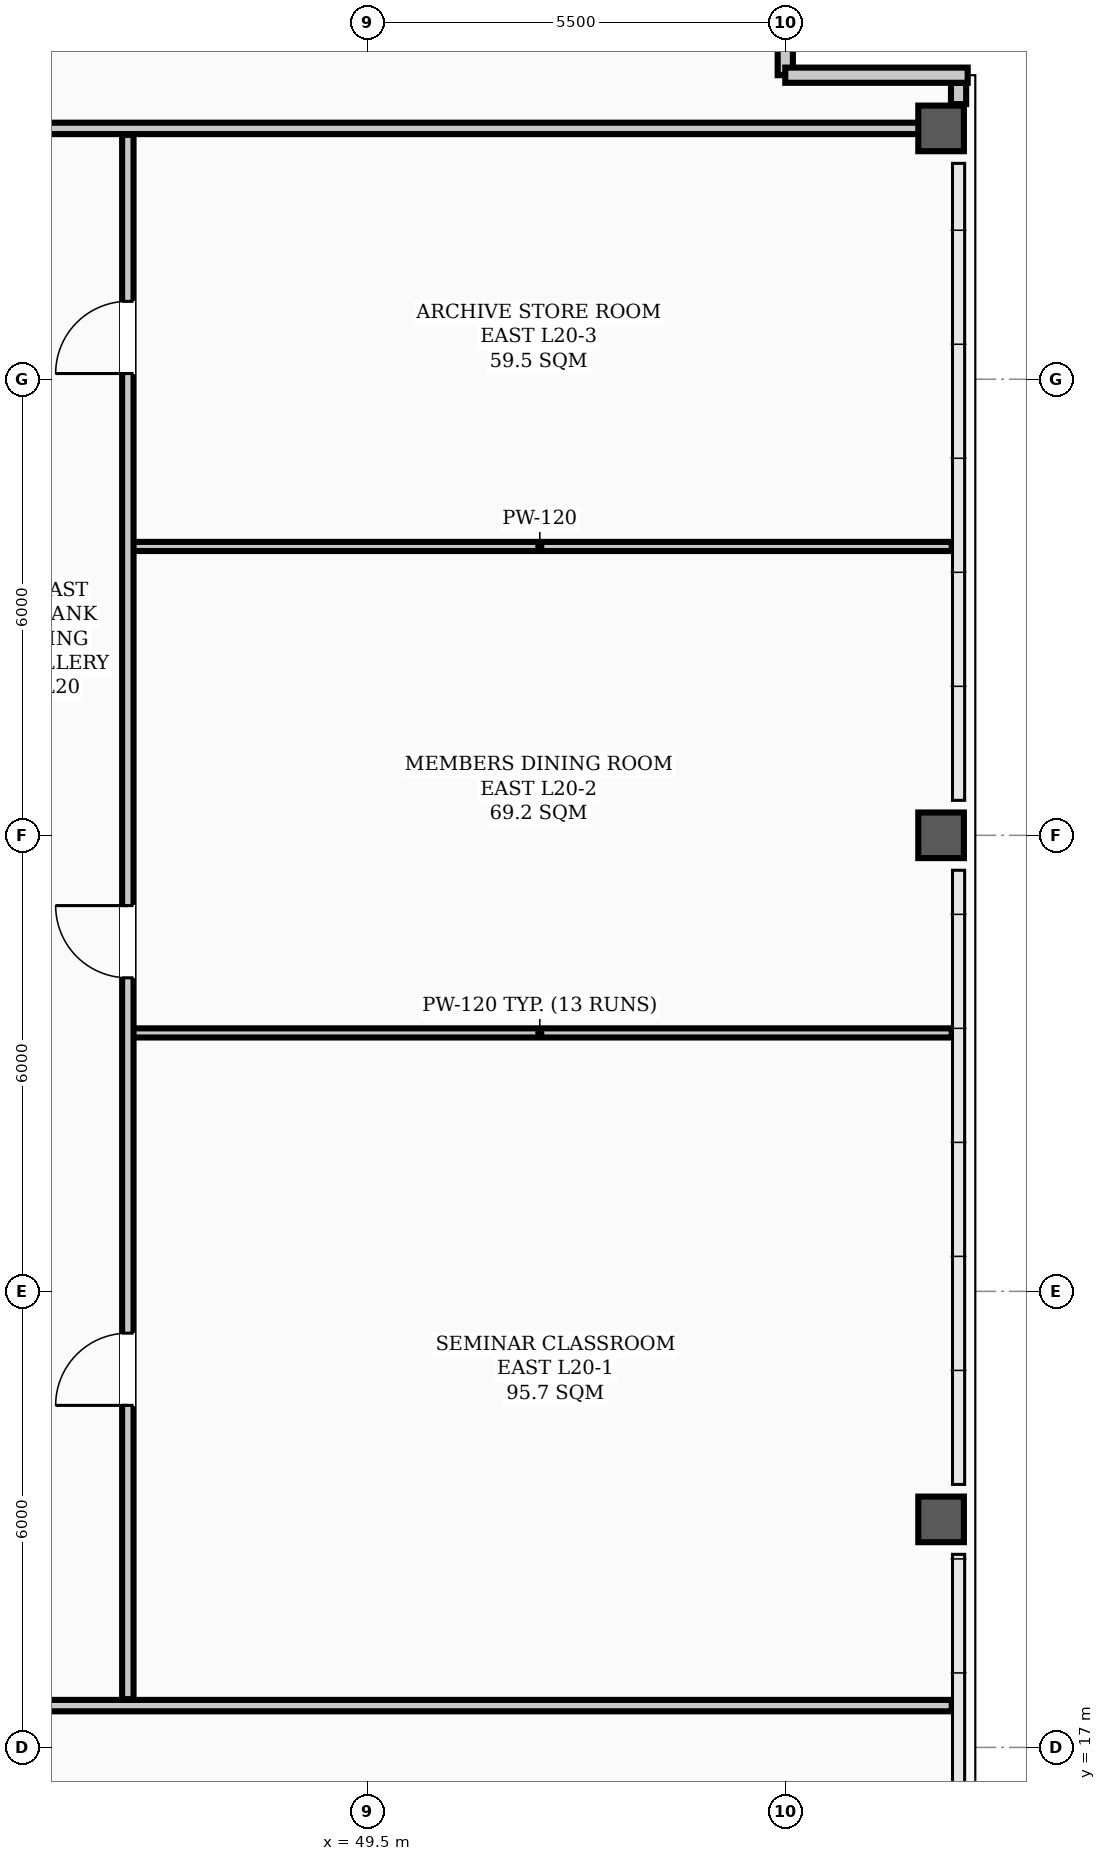
"""IFC4 building model, lengths in metres.
Left out: names, types, materials, properties, quantities, classifications, styles, units other than length and angle.
Written with IfcOpenShell. Run it as: python <this file> out.ifc"""

import sys

from ifc_helpers import new_model, si_unit, direction, frame, frame_2d, origin, origin_2d, place, context, subcontext, project, spatial, rectangle, hollow_rectangle, extrude, element, fill, save


model = new_model("IFC4")
c1 = context("Model", 3, precision=1e-05, world=origin(), true_north=direction((0.0, 1.0)))
c2 = subcontext(c1, "Body", "Model", "MODEL_VIEW")
j1 = project(units=[si_unit("LENGTHUNIT", "METRE"), si_unit("PLANEANGLEUNIT", "RADIAN")], contexts=[c1])
p1 = place(None, origin())
s1 = spatial("IfcSite", under=j1, at=p1, CompositionType="ELEMENT")
p2 = place(p1, origin())
s2 = spatial("IfcBuilding", under=s1, at=p2, CompositionType="ELEMENT")
p3 = place(p2, frame((0.0, 0.0, 81.1)))
s3 = spatial("IfcBuildingStorey", under=s2, at=p3, CompositionType="ELEMENT", Elevation=81.1)
for number, where, z_axis, x_axis in (
    (1, (57.05, 20.0, 0.0), (0.0, 0.0, 1.0), (1.0, 0.0, 0.0)),
    (2, (57.05, 29.0, 0.0), (0.0, 0.0, 1.0), (1.0, 0.0, 0.0)),
    (3, (57.05, 38.3, 0.0), (0.0, 0.0, 1.0), (1.0, 0.0, 0.0)),
):
    element("IfcColumn", number, at=place(p3, frame(where, z_axis=z_axis, x_axis=x_axis)), inside=s3, PredefinedType="COLUMN", context=c2, shape_type="SweptSolid", body=[
        extrude(hollow_rectangle(XDim=0.6, YDim=0.6, WallThickness=0.026, InnerFilletRadius=0.013, OuterFilletRadius=0.039, at=origin_2d()), origin(), (0.0, 0.0, 1.0), 3.9),
    ])
p4 = place(p3, frame((57.28, 38.62, 0.0), z_axis=(0.0, 0.0, 1.0), x_axis=(0.0, 1.0, 0.0)))
e4 = element("IfcWall", 4, at=p4, inside=s3, PredefinedType="PARAPET", context=c2, shape_type="SweptSolid", body=[
    extrude(rectangle(XDim=0.28, YDim=0.2, at=frame_2d((0.14, 0.0))), origin(), (0.0, 0.0, 1.0), 1.2),
])
for number, where, z_axis, x_axis in (
    (5, (55.0, 41.4, 0.0), (0.0, 0.0, 1.0), (0.0, -1.0, 0.0)),
    (6, (55.0, 39.0, 0.0), (0.0, 0.0, 1.0), (1.0, 0.0, 0.0)),
):
    element("IfcWall", number, at=place(p3, frame(where, z_axis=z_axis, x_axis=x_axis)), inside=s3, PredefinedType="PARAPET", context=c2, shape_type="SweptSolid", body=[
        extrude(rectangle(XDim=2.4, YDim=0.2, at=frame_2d((1.2, 0.0))), origin(), (0.0, 0.0, 1.0), 1.2),
    ])
p5 = place(p3, frame((7.81, 17.55, 0.0), z_axis=(0.0, 0.0, 1.0), x_axis=(1.0, 0.0, 0.0)))
e7 = element("IfcWall", 7, at=p5, inside=s3, PredefinedType="PARTITIONING", context=c2, shape_type="SweptSolid", body=[
    extrude(rectangle(XDim=49.38, YDim=0.15, at=frame_2d((24.69, 0.0))), origin(), (0.0, 0.0, 1.0), 3.1),
])
p6 = place(p5, frame((7.815, 0.0, 0.0)))
e8 = element("IfcOpeningElement", 8, at=p6, cuts=e7, PredefinedType="OPENING", context=c2, shape_type="SweptSolid", body=[
    extrude(rectangle(XDim=0.95, YDim=2.08, at=frame_2d((0.475, 1.04))), frame((0.0, 0.085, 0.0), z_axis=(0.0, -1.0, 0.0), x_axis=(1.0, 0.0, 0.0)), (0.0, 0.0, 1.0), 0.17),
])
p7 = place(p5, frame((13.815, 0.0, 0.0)))
e9 = element("IfcOpeningElement", 9, at=p7, cuts=e7, PredefinedType="OPENING", context=c2, shape_type="SweptSolid", body=[
    extrude(rectangle(XDim=0.95, YDim=2.08, at=frame_2d((0.475, 1.04))), frame((0.0, 0.085, 0.0), z_axis=(0.0, -1.0, 0.0), x_axis=(1.0, 0.0, 0.0)), (0.0, 0.0, 1.0), 0.17),
])
p8 = place(p5, frame((20.715, 0.0, 0.0)))
e10 = element("IfcOpeningElement", 10, at=p8, cuts=e7, PredefinedType="OPENING", context=c2, shape_type="SweptSolid", body=[
    extrude(rectangle(XDim=0.95, YDim=2.08, at=frame_2d((0.475, 1.04))), frame((0.0, 0.085, 0.0), z_axis=(0.0, -1.0, 0.0), x_axis=(1.0, 0.0, 0.0)), (0.0, 0.0, 1.0), 0.17),
])
p9 = place(p5, frame((30.915, 0.0, 0.0)))
e11 = element("IfcOpeningElement", 11, at=p9, cuts=e7, PredefinedType="OPENING", context=c2, shape_type="SweptSolid", body=[
    extrude(rectangle(XDim=0.95, YDim=2.08, at=frame_2d((0.475, 1.04))), frame((0.0, 0.085, 0.0), z_axis=(0.0, -1.0, 0.0), x_axis=(1.0, 0.0, 0.0)), (0.0, 0.0, 1.0), 0.17),
])
p10 = place(p5, frame((36.49, 0.0, 0.0)))
e12 = element("IfcOpeningElement", 12, at=p10, cuts=e7, PredefinedType="OPENING", context=c2, shape_type="SweptSolid", body=[
    extrude(rectangle(XDim=0.95, YDim=2.08, at=frame_2d((0.475, 1.04))), frame((0.0, 0.085, 0.0), z_axis=(0.0, -1.0, 0.0), x_axis=(1.0, 0.0, 0.0)), (0.0, 0.0, 1.0), 0.17),
])
p11 = place(p3, frame((44.0, 38.3, 0.0), z_axis=(0.0, 0.0, 1.0), x_axis=(1.0, 0.0, 0.0)))
e13 = element("IfcWall", 13, at=p11, inside=s3, PredefinedType="PARTITIONING", context=c2, shape_type="SweptSolid", body=[
    extrude(rectangle(XDim=13.19, YDim=0.15, at=frame_2d((6.595, 0.0))), origin(), (0.0, 0.0, 1.0), 3.0),
])
for number, where, z_axis, x_axis in (
    (14, (46.35, 26.4, 0.0), (0.0, 0.0, 1.0), (1.0, 0.0, 0.0)),
    (15, (46.35, 32.8, 0.0), (0.0, 0.0, 1.0), (1.0, 0.0, 0.0)),
):
    element("IfcWall", number, at=place(p3, frame(where, z_axis=z_axis, x_axis=x_axis)), inside=s3, PredefinedType="PARTITIONING", context=c2, shape_type="SweptSolid", body=[
        extrude(rectangle(XDim=10.84, YDim=0.12, at=frame_2d((5.42, 0.0))), origin(), (0.0, 0.0, 1.0), 3.212),
    ])
p12 = place(p3, frame((46.35, 17.635, 0.0), z_axis=(0.0, 0.0, 1.0), x_axis=(0.0, 1.0, 0.0)))
e16 = element("IfcWall", 16, at=p12, inside=s3, PredefinedType="PARTITIONING", context=c2, shape_type="SweptSolid", body=[
    extrude(rectangle(XDim=20.58, YDim=0.15, at=frame_2d((10.29, 0.0))), origin(), (0.0, 0.0, 1.0), 3.0),
])
p13 = place(p12, frame((3.865, 0.0, 0.0)))
e17 = element("IfcOpeningElement", 17, at=p13, cuts=e16, PredefinedType="OPENING", context=c2, shape_type="SweptSolid", body=[
    extrude(rectangle(XDim=0.95, YDim=2.08, at=frame_2d((0.475, 1.04))), frame((0.0, 0.085, 0.0), z_axis=(0.0, -1.0, 0.0), x_axis=(1.0, 0.0, 0.0)), (0.0, 0.0, 1.0), 0.17),
])
p14 = place(p12, frame((9.49, 0.0, 0.0)))
e18 = element("IfcOpeningElement", 18, at=p14, cuts=e16, PredefinedType="OPENING", context=c2, shape_type="SweptSolid", body=[
    extrude(rectangle(XDim=0.95, YDim=2.08, at=frame_2d((0.475, 1.04))), frame((0.0, 0.085, 0.0), z_axis=(0.0, -1.0, 0.0), x_axis=(1.0, 0.0, 0.0)), (0.0, 0.0, 1.0), 0.17),
])
p15 = place(p12, frame((17.44, 0.0, 0.0)))
e19 = element("IfcOpeningElement", 19, at=p15, cuts=e16, PredefinedType="OPENING", context=c2, shape_type="SweptSolid", body=[
    extrude(rectangle(XDim=0.95, YDim=2.08, at=frame_2d((0.475, 1.04))), frame((0.0, 0.085, 0.0), z_axis=(0.0, -1.0, 0.0), x_axis=(1.0, 0.0, 0.0)), (0.0, 0.0, 1.0), 0.17),
])
p16 = place(p13, origin())
e20 = element("IfcDoor", 20, at=p16, inside=s3, OperationType="SINGLE_SWING_LEFT", PredefinedType="DOOR", context=c2, shape_type="SweptSolid", body=[
    extrude(rectangle(XDim=0.95, YDim=2.08, at=frame_2d((0.475, 1.04))), frame((0.0, 0.025, 0.0), z_axis=(0.0, -1.0, 0.0), x_axis=(1.0, 0.0, 0.0)), (0.0, 0.0, 1.0), 0.05),
])
fill(e17, e20)
p17 = place(p14, origin())
e21 = element("IfcDoor", 21, at=p17, inside=s3, OperationType="SINGLE_SWING_RIGHT", PredefinedType="DOOR", context=c2, shape_type="SweptSolid", body=[
    extrude(rectangle(XDim=0.95, YDim=2.08, at=frame_2d((0.475, 1.04))), frame((0.0, 0.025, 0.0), z_axis=(0.0, -1.0, 0.0), x_axis=(1.0, 0.0, 0.0)), (0.0, 0.0, 1.0), 0.05),
])
fill(e18, e21)
p18 = place(p15, origin())
e22 = element("IfcDoor", 22, at=p18, inside=s3, OperationType="SINGLE_SWING_LEFT", PredefinedType="DOOR", context=c2, shape_type="SweptSolid", body=[
    extrude(rectangle(XDim=0.95, YDim=2.08, at=frame_2d((0.475, 1.04))), frame((0.0, 0.025, 0.0), z_axis=(0.0, -1.0, 0.0), x_axis=(1.0, 0.0, 0.0)), (0.0, 0.0, 1.0), 0.05),
])
fill(e19, e22)
save(model, sys.argv[1])
